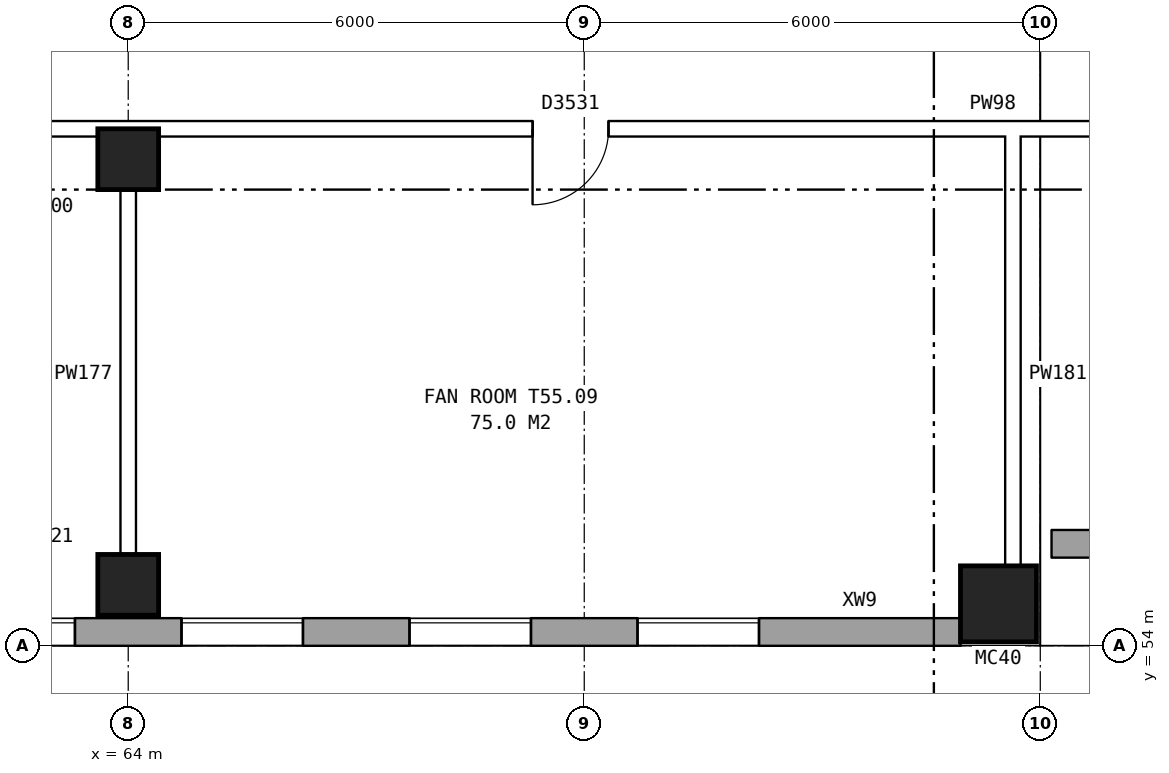
"""IFC4 building model, lengths in metres.
Left out: names, types, materials, properties, quantities, classifications, styles, units other than length and angle.
Written with IfcOpenShell. Run it as: python <this file> out.ifc"""

import sys

from ifc_helpers import new_model, si_unit, direction, frame, frame_2d, origin, origin_2d, place, context, subcontext, project, spatial, rectangle, hollow_rectangle, extrude, element, fill, save


model = new_model("IFC4")
c1 = context("Model", 3, precision=1e-05, world=origin(), true_north=direction((0.0, 1.0)))
c2 = subcontext(c1, "Body", "Model", "MODEL_VIEW")
j1 = project(units=[si_unit("LENGTHUNIT", "METRE"), si_unit("PLANEANGLEUNIT", "RADIAN")], contexts=[c1])
p1 = place(None, origin())
s1 = spatial("IfcSite", under=j1, at=p1, CompositionType="ELEMENT")
p2 = place(p1, origin())
s2 = spatial("IfcBuilding", under=s1, at=p2, CompositionType="ELEMENT")
p3 = place(p2, frame((0.0, 0.0, 194.4)))
s3 = spatial("IfcBuildingStorey", under=s2, at=p3, CompositionType="ELEMENT", Elevation=194.4)
for number, where, z_axis, x_axis in (
    (1, (64.0, 54.8, 0.0), (0.0, 0.0, 1.0), (1.0, 0.0, 0.0)),
    (2, (64.0, 60.4, 0.0), (0.0, 0.0, 1.0), (1.0, 0.0, 0.0)),
):
    element("IfcColumn", number, at=place(p3, frame(where, z_axis=z_axis, x_axis=x_axis)), inside=s3, PredefinedType="COLUMN", context=c2, shape_type="SweptSolid", body=[
        extrude(rectangle(XDim=0.8, YDim=0.8, at=origin_2d()), origin(), (0.0, 0.0, 1.0), 3.95),
    ])
p4 = place(p3, frame((75.45, 54.55, 0.0), z_axis=(0.0, 0.0, 1.0), x_axis=(1.0, 0.0, 0.0)))
e3 = element("IfcColumn", 3, at=p4, inside=s3, PredefinedType="COLUMN", context=c2, shape_type="SweptSolid", body=[
    extrude(hollow_rectangle(XDim=1.0, YDim=1.0, WallThickness=0.055, at=origin_2d()), origin(), (0.0, 0.0, 1.0), 4.2),
])
p5 = place(p3, frame((35.075, 54.18, 0.0), z_axis=(0.0, 0.0, 1.0), x_axis=(1.0, 0.0, 0.0)))
e4 = element("IfcWall", 4, at=p5, inside=s3, PredefinedType="STANDARD", context=c2, shape_type="SweptSolid", body=[
    extrude(rectangle(XDim=39.875, YDim=0.36, at=frame_2d((19.938, 0.0))), origin(), (0.0, 0.0, 1.0), 3.95),
])
p6 = place(p5, frame((2.625, 0.0, 1.5)))
e5 = element("IfcOpeningElement", 5, at=p6, cuts=e4, PredefinedType="OPENING", context=c2, shape_type="SweptSolid", body=[
    extrude(rectangle(XDim=1.6, YDim=1.2, at=frame_2d((0.8, 0.6))), frame((0.0, 0.19, 0.0), z_axis=(0.0, -1.0, 0.0), x_axis=(1.0, 0.0, 0.0)), (0.0, 0.0, 1.0), 0.38),
])
p7 = place(p5, frame((5.625, 0.0, 1.5)))
e6 = element("IfcOpeningElement", 6, at=p7, cuts=e4, PredefinedType="OPENING", context=c2, shape_type="SweptSolid", body=[
    extrude(rectangle(XDim=1.6, YDim=1.2, at=frame_2d((0.8, 0.6))), frame((0.0, 0.19, 0.0), z_axis=(0.0, -1.0, 0.0), x_axis=(1.0, 0.0, 0.0)), (0.0, 0.0, 1.0), 0.38),
])
p8 = place(p5, frame((8.625, 0.0, 1.5)))
e7 = element("IfcOpeningElement", 7, at=p8, cuts=e4, PredefinedType="OPENING", context=c2, shape_type="SweptSolid", body=[
    extrude(rectangle(XDim=1.6, YDim=1.2, at=frame_2d((0.8, 0.6))), frame((0.0, 0.19, 0.0), z_axis=(0.0, -1.0, 0.0), x_axis=(1.0, 0.0, 0.0)), (0.0, 0.0, 1.0), 0.38),
])
p9 = place(p5, frame((11.625, 0.0, 1.5)))
e8 = element("IfcOpeningElement", 8, at=p9, cuts=e4, PredefinedType="OPENING", context=c2, shape_type="SweptSolid", body=[
    extrude(rectangle(XDim=1.6, YDim=1.2, at=frame_2d((0.8, 0.6))), frame((0.0, 0.19, 0.0), z_axis=(0.0, -1.0, 0.0), x_axis=(1.0, 0.0, 0.0)), (0.0, 0.0, 1.0), 0.38),
])
p10 = place(p5, frame((14.625, 0.0, 1.5)))
e9 = element("IfcOpeningElement", 9, at=p10, cuts=e4, PredefinedType="OPENING", context=c2, shape_type="SweptSolid", body=[
    extrude(rectangle(XDim=1.6, YDim=1.2, at=frame_2d((0.8, 0.6))), frame((0.0, 0.19, 0.0), z_axis=(0.0, -1.0, 0.0), x_axis=(1.0, 0.0, 0.0)), (0.0, 0.0, 1.0), 0.38),
])
p11 = place(p5, frame((17.625, 0.0, 1.5)))
e10 = element("IfcOpeningElement", 10, at=p11, cuts=e4, PredefinedType="OPENING", context=c2, shape_type="SweptSolid", body=[
    extrude(rectangle(XDim=1.6, YDim=1.2, at=frame_2d((0.8, 0.6))), frame((0.0, 0.19, 0.0), z_axis=(0.0, -1.0, 0.0), x_axis=(1.0, 0.0, 0.0)), (0.0, 0.0, 1.0), 0.38),
])
p12 = place(p5, frame((20.625, 0.0, 1.5)))
e11 = element("IfcOpeningElement", 11, at=p12, cuts=e4, PredefinedType="OPENING", context=c2, shape_type="SweptSolid", body=[
    extrude(rectangle(XDim=1.6, YDim=1.2, at=frame_2d((0.8, 0.6))), frame((0.0, 0.19, 0.0), z_axis=(0.0, -1.0, 0.0), x_axis=(1.0, 0.0, 0.0)), (0.0, 0.0, 1.0), 0.38),
])
p13 = place(p5, frame((23.625, 0.0, 1.5)))
e12 = element("IfcOpeningElement", 12, at=p13, cuts=e4, PredefinedType="OPENING", context=c2, shape_type="SweptSolid", body=[
    extrude(rectangle(XDim=1.6, YDim=1.2, at=frame_2d((0.8, 0.6))), frame((0.0, 0.19, 0.0), z_axis=(0.0, -1.0, 0.0), x_axis=(1.0, 0.0, 0.0)), (0.0, 0.0, 1.0), 0.38),
])
p14 = place(p5, frame((26.625, 0.0, 1.5)))
e13 = element("IfcOpeningElement", 13, at=p14, cuts=e4, PredefinedType="OPENING", context=c2, shape_type="SweptSolid", body=[
    extrude(rectangle(XDim=1.6, YDim=1.2, at=frame_2d((0.8, 0.6))), frame((0.0, 0.19, 0.0), z_axis=(0.0, -1.0, 0.0), x_axis=(1.0, 0.0, 0.0)), (0.0, 0.0, 1.0), 0.38),
])
p15 = place(p5, frame((29.625, 0.0, 1.5)))
e14 = element("IfcOpeningElement", 14, at=p15, cuts=e4, PredefinedType="OPENING", context=c2, shape_type="SweptSolid", body=[
    extrude(rectangle(XDim=1.6, YDim=1.2, at=frame_2d((0.8, 0.6))), frame((0.0, 0.19, 0.0), z_axis=(0.0, -1.0, 0.0), x_axis=(1.0, 0.0, 0.0)), (0.0, 0.0, 1.0), 0.38),
])
p16 = place(p5, frame((32.625, 0.0, 1.5)))
e15 = element("IfcOpeningElement", 15, at=p16, cuts=e4, PredefinedType="OPENING", context=c2, shape_type="SweptSolid", body=[
    extrude(rectangle(XDim=1.6, YDim=1.2, at=frame_2d((0.8, 0.6))), frame((0.0, 0.19, 0.0), z_axis=(0.0, -1.0, 0.0), x_axis=(1.0, 0.0, 0.0)), (0.0, 0.0, 1.0), 0.38),
])
p17 = place(p5, frame((35.625, 0.0, 1.5)))
e16 = element("IfcOpeningElement", 16, at=p17, cuts=e4, PredefinedType="OPENING", context=c2, shape_type="SweptSolid", body=[
    extrude(rectangle(XDim=1.6, YDim=1.2, at=frame_2d((0.8, 0.6))), frame((0.0, 0.19, 0.0), z_axis=(0.0, -1.0, 0.0), x_axis=(1.0, 0.0, 0.0)), (0.0, 0.0, 1.0), 0.38),
])
p18 = place(p3, frame((76.15, 55.34, 0.0), z_axis=(0.0, 0.0, 1.0), x_axis=(1.0, 0.0, 0.0)))
e17 = element("IfcWall", 17, at=p18, inside=s3, PredefinedType="STANDARD", context=c2, shape_type="SweptSolid", body=[
    extrude(rectangle(XDim=54.7, YDim=0.36, at=frame_2d((27.35, 0.0))), origin(), (0.0, 0.0, 1.0), 3.95),
])
p19 = place(p18, frame((0.769, 0.0, 1.5)))
e18 = element("IfcOpeningElement", 18, at=p19, cuts=e17, PredefinedType="OPENING", context=c2, shape_type="SweptSolid", body=[
    extrude(rectangle(XDim=1.6, YDim=1.2, at=frame_2d((0.8, 0.6))), frame((0.0, 0.19, 0.0), z_axis=(0.0, -1.0, 0.0), x_axis=(1.0, 0.0, 0.0)), (0.0, 0.0, 1.0), 0.38),
])
p20 = place(p18, frame((2.7, 0.0, 1.5)))
e19 = element("IfcOpeningElement", 19, at=p20, cuts=e17, PredefinedType="OPENING", context=c2, shape_type="SweptSolid", body=[
    extrude(rectangle(XDim=0.6, YDim=1.2, at=frame_2d((0.3, 0.6))), frame((0.0, 0.19, 0.0), z_axis=(0.0, -1.0, 0.0), x_axis=(1.0, 0.0, 0.0)), (0.0, 0.0, 1.0), 0.38),
])
p21 = place(p18, frame((7.644, 0.0, 1.5)))
e20 = element("IfcOpeningElement", 20, at=p21, cuts=e17, PredefinedType="OPENING", context=c2, shape_type="SweptSolid", body=[
    extrude(rectangle(XDim=1.6, YDim=1.2, at=frame_2d((0.8, 0.6))), frame((0.0, 0.19, 0.0), z_axis=(0.0, -1.0, 0.0), x_axis=(1.0, 0.0, 0.0)), (0.0, 0.0, 1.0), 0.38),
])
p22 = place(p18, frame((5.3, 0.0, 1.5)))
e21 = element("IfcOpeningElement", 21, at=p22, cuts=e17, PredefinedType="OPENING", context=c2, shape_type="SweptSolid", body=[
    extrude(rectangle(XDim=1.6, YDim=1.2, at=frame_2d((0.8, 0.6))), frame((0.0, 0.19, 0.0), z_axis=(0.0, -1.0, 0.0), x_axis=(1.0, 0.0, 0.0)), (0.0, 0.0, 1.0), 0.38),
])
p23 = place(p18, frame((14.519, 0.0, 1.5)))
e22 = element("IfcOpeningElement", 22, at=p23, cuts=e17, PredefinedType="OPENING", context=c2, shape_type="SweptSolid", body=[
    extrude(rectangle(XDim=1.6, YDim=1.2, at=frame_2d((0.8, 0.6))), frame((0.0, 0.19, 0.0), z_axis=(0.0, -1.0, 0.0), x_axis=(1.0, 0.0, 0.0)), (0.0, 0.0, 1.0), 0.38),
])
p24 = place(p18, frame((16.45, 0.0, 1.5)))
e23 = element("IfcOpeningElement", 23, at=p24, cuts=e17, PredefinedType="OPENING", context=c2, shape_type="SweptSolid", body=[
    extrude(rectangle(XDim=0.6, YDim=1.2, at=frame_2d((0.3, 0.6))), frame((0.0, 0.19, 0.0), z_axis=(0.0, -1.0, 0.0), x_axis=(1.0, 0.0, 0.0)), (0.0, 0.0, 1.0), 0.38),
])
p25 = place(p18, frame((21.394, 0.0, 1.5)))
e24 = element("IfcOpeningElement", 24, at=p25, cuts=e17, PredefinedType="OPENING", context=c2, shape_type="SweptSolid", body=[
    extrude(rectangle(XDim=1.6, YDim=1.2, at=frame_2d((0.8, 0.6))), frame((0.0, 0.19, 0.0), z_axis=(0.0, -1.0, 0.0), x_axis=(1.0, 0.0, 0.0)), (0.0, 0.0, 1.0), 0.38),
])
p26 = place(p18, frame((19.05, 0.0, 1.5)))
e25 = element("IfcOpeningElement", 25, at=p26, cuts=e17, PredefinedType="OPENING", context=c2, shape_type="SweptSolid", body=[
    extrude(rectangle(XDim=1.6, YDim=1.2, at=frame_2d((0.8, 0.6))), frame((0.0, 0.19, 0.0), z_axis=(0.0, -1.0, 0.0), x_axis=(1.0, 0.0, 0.0)), (0.0, 0.0, 1.0), 0.38),
])
p27 = place(p18, frame((27.55, 0.0, 1.5)))
e26 = element("IfcOpeningElement", 26, at=p27, cuts=e17, PredefinedType="OPENING", context=c2, shape_type="SweptSolid", body=[
    extrude(rectangle(XDim=1.2, YDim=1.2, at=frame_2d((0.6, 0.6))), frame((0.0, 0.19, 0.0), z_axis=(0.0, -1.0, 0.0), x_axis=(1.0, 0.0, 0.0)), (0.0, 0.0, 1.0), 0.38),
])
p28 = place(p18, frame((31.706, 0.0, 1.5)))
e27 = element("IfcOpeningElement", 27, at=p28, cuts=e17, PredefinedType="OPENING", context=c2, shape_type="SweptSolid", body=[
    extrude(rectangle(XDim=1.6, YDim=1.2, at=frame_2d((0.8, 0.6))), frame((0.0, 0.19, 0.0), z_axis=(0.0, -1.0, 0.0), x_axis=(1.0, 0.0, 0.0)), (0.0, 0.0, 1.0), 0.38),
])
p29 = place(p18, frame((30.65, 0.0, 1.5)))
e28 = element("IfcOpeningElement", 28, at=p29, cuts=e17, PredefinedType="OPENING", context=c2, shape_type="SweptSolid", body=[
    extrude(rectangle(XDim=0.6, YDim=1.2, at=frame_2d((0.3, 0.6))), frame((0.0, 0.19, 0.0), z_axis=(0.0, -1.0, 0.0), x_axis=(1.0, 0.0, 0.0)), (0.0, 0.0, 1.0), 0.38),
])
p30 = place(p18, frame((38.581, 0.0, 1.5)))
e29 = element("IfcOpeningElement", 29, at=p30, cuts=e17, PredefinedType="OPENING", context=c2, shape_type="SweptSolid", body=[
    extrude(rectangle(XDim=1.6, YDim=1.2, at=frame_2d((0.8, 0.6))), frame((0.0, 0.19, 0.0), z_axis=(0.0, -1.0, 0.0), x_axis=(1.0, 0.0, 0.0)), (0.0, 0.0, 1.0), 0.38),
])
p31 = place(p18, frame((41.3, 0.0, 1.5)))
e30 = element("IfcOpeningElement", 30, at=p31, cuts=e17, PredefinedType="OPENING", context=c2, shape_type="SweptSolid", body=[
    extrude(rectangle(XDim=1.2, YDim=1.2, at=frame_2d((0.6, 0.6))), frame((0.0, 0.19, 0.0), z_axis=(0.0, -1.0, 0.0), x_axis=(1.0, 0.0, 0.0)), (0.0, 0.0, 1.0), 0.38),
])
p32 = place(p18, frame((45.456, 0.0, 1.5)))
e31 = element("IfcOpeningElement", 31, at=p32, cuts=e17, PredefinedType="OPENING", context=c2, shape_type="SweptSolid", body=[
    extrude(rectangle(XDim=1.6, YDim=1.2, at=frame_2d((0.8, 0.6))), frame((0.0, 0.19, 0.0), z_axis=(0.0, -1.0, 0.0), x_axis=(1.0, 0.0, 0.0)), (0.0, 0.0, 1.0), 0.38),
])
p33 = place(p18, frame((44.4, 0.0, 1.5)))
e32 = element("IfcOpeningElement", 32, at=p33, cuts=e17, PredefinedType="OPENING", context=c2, shape_type="SweptSolid", body=[
    extrude(rectangle(XDim=0.6, YDim=1.2, at=frame_2d((0.3, 0.6))), frame((0.0, 0.19, 0.0), z_axis=(0.0, -1.0, 0.0), x_axis=(1.0, 0.0, 0.0)), (0.0, 0.0, 1.0), 0.38),
])
p34 = place(p18, frame((52.331, 0.0, 1.5)))
e33 = element("IfcOpeningElement", 33, at=p34, cuts=e17, PredefinedType="OPENING", context=c2, shape_type="SweptSolid", body=[
    extrude(rectangle(XDim=1.6, YDim=1.2, at=frame_2d((0.8, 0.6))), frame((0.0, 0.19, 0.0), z_axis=(0.0, -1.0, 0.0), x_axis=(1.0, 0.0, 0.0)), (0.0, 0.0, 1.0), 0.38),
])
p35 = place(p18, frame((9.55, 0.0, 1.5)))
e34 = element("IfcOpeningElement", 34, at=p35, cuts=e17, PredefinedType="OPENING", context=c2, shape_type="SweptSolid", body=[
    extrude(rectangle(XDim=0.6, YDim=1.2, at=frame_2d((0.3, 0.6))), frame((0.0, 0.19, 0.0), z_axis=(0.0, -1.0, 0.0), x_axis=(1.0, 0.0, 0.0)), (0.0, 0.0, 1.0), 0.38),
])
p36 = place(p18, frame((12.15, 0.0, 1.5)))
e35 = element("IfcOpeningElement", 35, at=p36, cuts=e17, PredefinedType="OPENING", context=c2, shape_type="SweptSolid", body=[
    extrude(rectangle(XDim=1.2, YDim=1.2, at=frame_2d((0.6, 0.6))), frame((0.0, 0.19, 0.0), z_axis=(0.0, -1.0, 0.0), x_axis=(1.0, 0.0, 0.0)), (0.0, 0.0, 1.0), 0.38),
])
p37 = place(p18, frame((23.3, 0.0, 1.5)))
e36 = element("IfcOpeningElement", 36, at=p37, cuts=e17, PredefinedType="OPENING", context=c2, shape_type="SweptSolid", body=[
    extrude(rectangle(XDim=0.6, YDim=1.2, at=frame_2d((0.3, 0.6))), frame((0.0, 0.19, 0.0), z_axis=(0.0, -1.0, 0.0), x_axis=(1.0, 0.0, 0.0)), (0.0, 0.0, 1.0), 0.38),
])
p38 = place(p18, frame((25.9, 0.0, 1.5)))
e37 = element("IfcOpeningElement", 37, at=p38, cuts=e17, PredefinedType="OPENING", context=c2, shape_type="SweptSolid", body=[
    extrude(rectangle(XDim=1.2, YDim=1.2, at=frame_2d((0.6, 0.6))), frame((0.0, 0.19, 0.0), z_axis=(0.0, -1.0, 0.0), x_axis=(1.0, 0.0, 0.0)), (0.0, 0.0, 1.0), 0.38),
])
p39 = place(p18, frame((33.65, 0.0, 1.5)))
e38 = element("IfcOpeningElement", 38, at=p39, cuts=e17, PredefinedType="OPENING", context=c2, shape_type="SweptSolid", body=[
    extrude(rectangle(XDim=1.6, YDim=1.2, at=frame_2d((0.8, 0.6))), frame((0.0, 0.19, 0.0), z_axis=(0.0, -1.0, 0.0), x_axis=(1.0, 0.0, 0.0)), (0.0, 0.0, 1.0), 0.38),
])
p40 = place(p18, frame((37.5, 0.0, 1.5)))
e39 = element("IfcOpeningElement", 39, at=p40, cuts=e17, PredefinedType="OPENING", context=c2, shape_type="SweptSolid", body=[
    extrude(rectangle(XDim=0.6, YDim=1.2, at=frame_2d((0.3, 0.6))), frame((0.0, 0.19, 0.0), z_axis=(0.0, -1.0, 0.0), x_axis=(1.0, 0.0, 0.0)), (0.0, 0.0, 1.0), 0.38),
])
p41 = place(p18, frame((47.4, 0.0, 1.5)))
e40 = element("IfcOpeningElement", 40, at=p41, cuts=e17, PredefinedType="OPENING", context=c2, shape_type="SweptSolid", body=[
    extrude(rectangle(XDim=1.6, YDim=1.2, at=frame_2d((0.8, 0.6))), frame((0.0, 0.19, 0.0), z_axis=(0.0, -1.0, 0.0), x_axis=(1.0, 0.0, 0.0)), (0.0, 0.0, 1.0), 0.38),
])
p42 = place(p18, frame((51.25, 0.0, 1.5)))
e41 = element("IfcOpeningElement", 41, at=p42, cuts=e17, PredefinedType="OPENING", context=c2, shape_type="SweptSolid", body=[
    extrude(rectangle(XDim=0.6, YDim=1.2, at=frame_2d((0.3, 0.6))), frame((0.0, 0.19, 0.0), z_axis=(0.0, -1.0, 0.0), x_axis=(1.0, 0.0, 0.0)), (0.0, 0.0, 1.0), 0.38),
])
p43 = place(p3, frame((32.24, 60.8, 0.0), z_axis=(0.0, 0.0, 1.0), x_axis=(1.0, 0.0, 0.0)))
e42 = element("IfcWall", 42, at=p43, inside=s3, PredefinedType="PARTITIONING", context=c2, shape_type="SweptSolid", body=[
    extrude(rectangle(XDim=136.52, YDim=0.2, at=frame_2d((68.26, 0.0))), origin(), (0.0, 0.0, 1.0), 3.95),
])
p44 = place(p43, frame((3.44, 0.0, 0.0)))
e43 = element("IfcOpeningElement", 43, at=p44, cuts=e42, PredefinedType="OPENING", context=c2, shape_type="SweptSolid", body=[
    extrude(rectangle(XDim=1.0, YDim=2.1, at=frame_2d((0.5, 1.05))), frame((0.0, 0.11, 0.0), z_axis=(0.0, -1.0, 0.0), x_axis=(1.0, 0.0, 0.0)), (0.0, 0.0, 1.0), 0.22),
])
p45 = place(p43, frame((13.26, 0.0, 0.0)))
e44 = element("IfcOpeningElement", 44, at=p45, cuts=e42, PredefinedType="OPENING", context=c2, shape_type="SweptSolid", body=[
    extrude(rectangle(XDim=1.0, YDim=2.1, at=frame_2d((0.5, 1.05))), frame((0.0, 0.11, 0.0), z_axis=(0.0, -1.0, 0.0), x_axis=(1.0, 0.0, 0.0)), (0.0, 0.0, 1.0), 0.22),
])
p46 = place(p43, frame((25.26, 0.0, 0.0)))
e45 = element("IfcOpeningElement", 45, at=p46, cuts=e42, PredefinedType="OPENING", context=c2, shape_type="SweptSolid", body=[
    extrude(rectangle(XDim=1.0, YDim=2.1, at=frame_2d((0.5, 1.05))), frame((0.0, 0.11, 0.0), z_axis=(0.0, -1.0, 0.0), x_axis=(1.0, 0.0, 0.0)), (0.0, 0.0, 1.0), 0.22),
])
p47 = place(p43, frame((37.08, 0.0, 0.0)))
e46 = element("IfcOpeningElement", 46, at=p47, cuts=e42, PredefinedType="OPENING", context=c2, shape_type="SweptSolid", body=[
    extrude(rectangle(XDim=1.0, YDim=2.1, at=frame_2d((0.5, 1.05))), frame((0.0, 0.11, 0.0), z_axis=(0.0, -1.0, 0.0), x_axis=(1.0, 0.0, 0.0)), (0.0, 0.0, 1.0), 0.22),
])
p48 = place(p43, frame((49.955, 0.0, 0.0)))
e47 = element("IfcOpeningElement", 47, at=p48, cuts=e42, PredefinedType="OPENING", context=c2, shape_type="SweptSolid", body=[
    extrude(rectangle(XDim=1.0, YDim=2.1, at=frame_2d((0.5, 1.05))), frame((0.0, 0.11, 0.0), z_axis=(0.0, -1.0, 0.0), x_axis=(1.0, 0.0, 0.0)), (0.0, 0.0, 1.0), 0.22),
])
p49 = place(p43, frame((63.885, 0.0, 0.0)))
e48 = element("IfcOpeningElement", 48, at=p49, cuts=e42, PredefinedType="OPENING", context=c2, shape_type="SweptSolid", body=[
    extrude(rectangle(XDim=1.0, YDim=2.1, at=frame_2d((0.5, 1.05))), frame((0.0, 0.11, 0.0), z_axis=(0.0, -1.0, 0.0), x_axis=(1.0, 0.0, 0.0)), (0.0, 0.0, 1.0), 0.22),
])
p50 = place(p43, frame((77.635, 0.0, 0.0)))
e49 = element("IfcOpeningElement", 49, at=p50, cuts=e42, PredefinedType="OPENING", context=c2, shape_type="SweptSolid", body=[
    extrude(rectangle(XDim=1.0, YDim=2.1, at=frame_2d((0.5, 1.05))), frame((0.0, 0.11, 0.0), z_axis=(0.0, -1.0, 0.0), x_axis=(1.0, 0.0, 0.0)), (0.0, 0.0, 1.0), 0.22),
])
p51 = place(p43, frame((91.565, 0.0, 0.0)))
e50 = element("IfcOpeningElement", 50, at=p51, cuts=e42, PredefinedType="OPENING", context=c2, shape_type="SweptSolid", body=[
    extrude(rectangle(XDim=1.0, YDim=2.1, at=frame_2d((0.5, 1.05))), frame((0.0, 0.11, 0.0), z_axis=(0.0, -1.0, 0.0), x_axis=(1.0, 0.0, 0.0)), (0.0, 0.0, 1.0), 0.22),
])
p52 = place(p43, frame((104.44, 0.0, 0.0)))
e51 = element("IfcOpeningElement", 51, at=p52, cuts=e42, PredefinedType="OPENING", context=c2, shape_type="SweptSolid", body=[
    extrude(rectangle(XDim=1.0, YDim=2.1, at=frame_2d((0.5, 1.05))), frame((0.0, 0.11, 0.0), z_axis=(0.0, -1.0, 0.0), x_axis=(1.0, 0.0, 0.0)), (0.0, 0.0, 1.0), 0.22),
])
p53 = place(p43, frame((116.26, 0.0, 0.0)))
e52 = element("IfcOpeningElement", 52, at=p53, cuts=e42, PredefinedType="OPENING", context=c2, shape_type="SweptSolid", body=[
    extrude(rectangle(XDim=1.0, YDim=2.1, at=frame_2d((0.5, 1.05))), frame((0.0, 0.11, 0.0), z_axis=(0.0, -1.0, 0.0), x_axis=(1.0, 0.0, 0.0)), (0.0, 0.0, 1.0), 0.22),
])
p54 = place(p43, frame((129.08, 0.0, 0.0)))
e53 = element("IfcOpeningElement", 53, at=p54, cuts=e42, PredefinedType="OPENING", context=c2, shape_type="SweptSolid", body=[
    extrude(rectangle(XDim=1.0, YDim=2.1, at=frame_2d((0.5, 1.05))), frame((0.0, 0.11, 0.0), z_axis=(0.0, -1.0, 0.0), x_axis=(1.0, 0.0, 0.0)), (0.0, 0.0, 1.0), 0.22),
])
for number, where, z_axis, x_axis in (
    (54, (64.0, 54.24, 0.0), (0.0, 0.0, 1.0), (0.0, 1.0, 0.0)),
    (55, (75.64, 54.24, 0.0), (0.0, 0.0, 1.0), (0.0, 1.0, 0.0)),
):
    element("IfcWall", number, at=place(p3, frame(where, z_axis=z_axis, x_axis=x_axis)), inside=s3, PredefinedType="PARTITIONING", context=c2, shape_type="SweptSolid", body=[
        extrude(rectangle(XDim=6.66, YDim=0.2, at=frame_2d((3.33, 0.0))), origin(), (0.0, 0.0, 1.0), 3.95),
    ])
p55 = place(p14, origin())
e56 = element("IfcWindow", 56, at=p55, inside=s3, PartitioningType="DOUBLE_PANEL_HORIZONTAL", PredefinedType="WINDOW", context=c2, shape_type="SweptSolid", body=[
    extrude(rectangle(XDim=1.6, YDim=1.2, at=frame_2d((0.8, 0.6))), frame((0.0, 0.15, 0.0), z_axis=(0.0, -1.0, 0.0), x_axis=(1.0, 0.0, 0.0)), (0.0, 0.0, 1.0), 0.06),
])
fill(e13, e56)
p56 = place(p15, origin())
e57 = element("IfcWindow", 57, at=p56, inside=s3, PartitioningType="DOUBLE_PANEL_HORIZONTAL", PredefinedType="WINDOW", context=c2, shape_type="SweptSolid", body=[
    extrude(rectangle(XDim=1.6, YDim=1.2, at=frame_2d((0.8, 0.6))), frame((0.0, 0.15, 0.0), z_axis=(0.0, -1.0, 0.0), x_axis=(1.0, 0.0, 0.0)), (0.0, 0.0, 1.0), 0.06),
])
fill(e14, e57)
p57 = place(p16, origin())
e58 = element("IfcWindow", 58, at=p57, inside=s3, PartitioningType="DOUBLE_PANEL_HORIZONTAL", PredefinedType="WINDOW", context=c2, shape_type="SweptSolid", body=[
    extrude(rectangle(XDim=1.6, YDim=1.2, at=frame_2d((0.8, 0.6))), frame((0.0, 0.15, 0.0), z_axis=(0.0, -1.0, 0.0), x_axis=(1.0, 0.0, 0.0)), (0.0, 0.0, 1.0), 0.06),
])
fill(e15, e58)
p58 = place(p17, origin())
e59 = element("IfcWindow", 59, at=p58, inside=s3, PartitioningType="DOUBLE_PANEL_HORIZONTAL", PredefinedType="WINDOW", context=c2, shape_type="SweptSolid", body=[
    extrude(rectangle(XDim=1.6, YDim=1.2, at=frame_2d((0.8, 0.6))), frame((0.0, 0.15, 0.0), z_axis=(0.0, -1.0, 0.0), x_axis=(1.0, 0.0, 0.0)), (0.0, 0.0, 1.0), 0.06),
])
fill(e16, e59)
p59 = place(p47, frame((1.0, 0.0, 0.0), z_axis=(0.0, 0.0, 1.0), x_axis=(-1.0, 0.0, 0.0)))
e60 = element("IfcDoor", 60, at=p59, inside=s3, OperationType="SINGLE_SWING_RIGHT", PredefinedType="DOOR", context=c2, shape_type="SweptSolid", body=[
    extrude(rectangle(XDim=1.0, YDim=2.1, at=frame_2d((0.5, 1.05))), frame((0.0, 0.025, 0.0), z_axis=(0.0, -1.0, 0.0), x_axis=(1.0, 0.0, 0.0)), (0.0, 0.0, 1.0), 0.05),
])
fill(e46, e60)
save(model, sys.argv[1])
